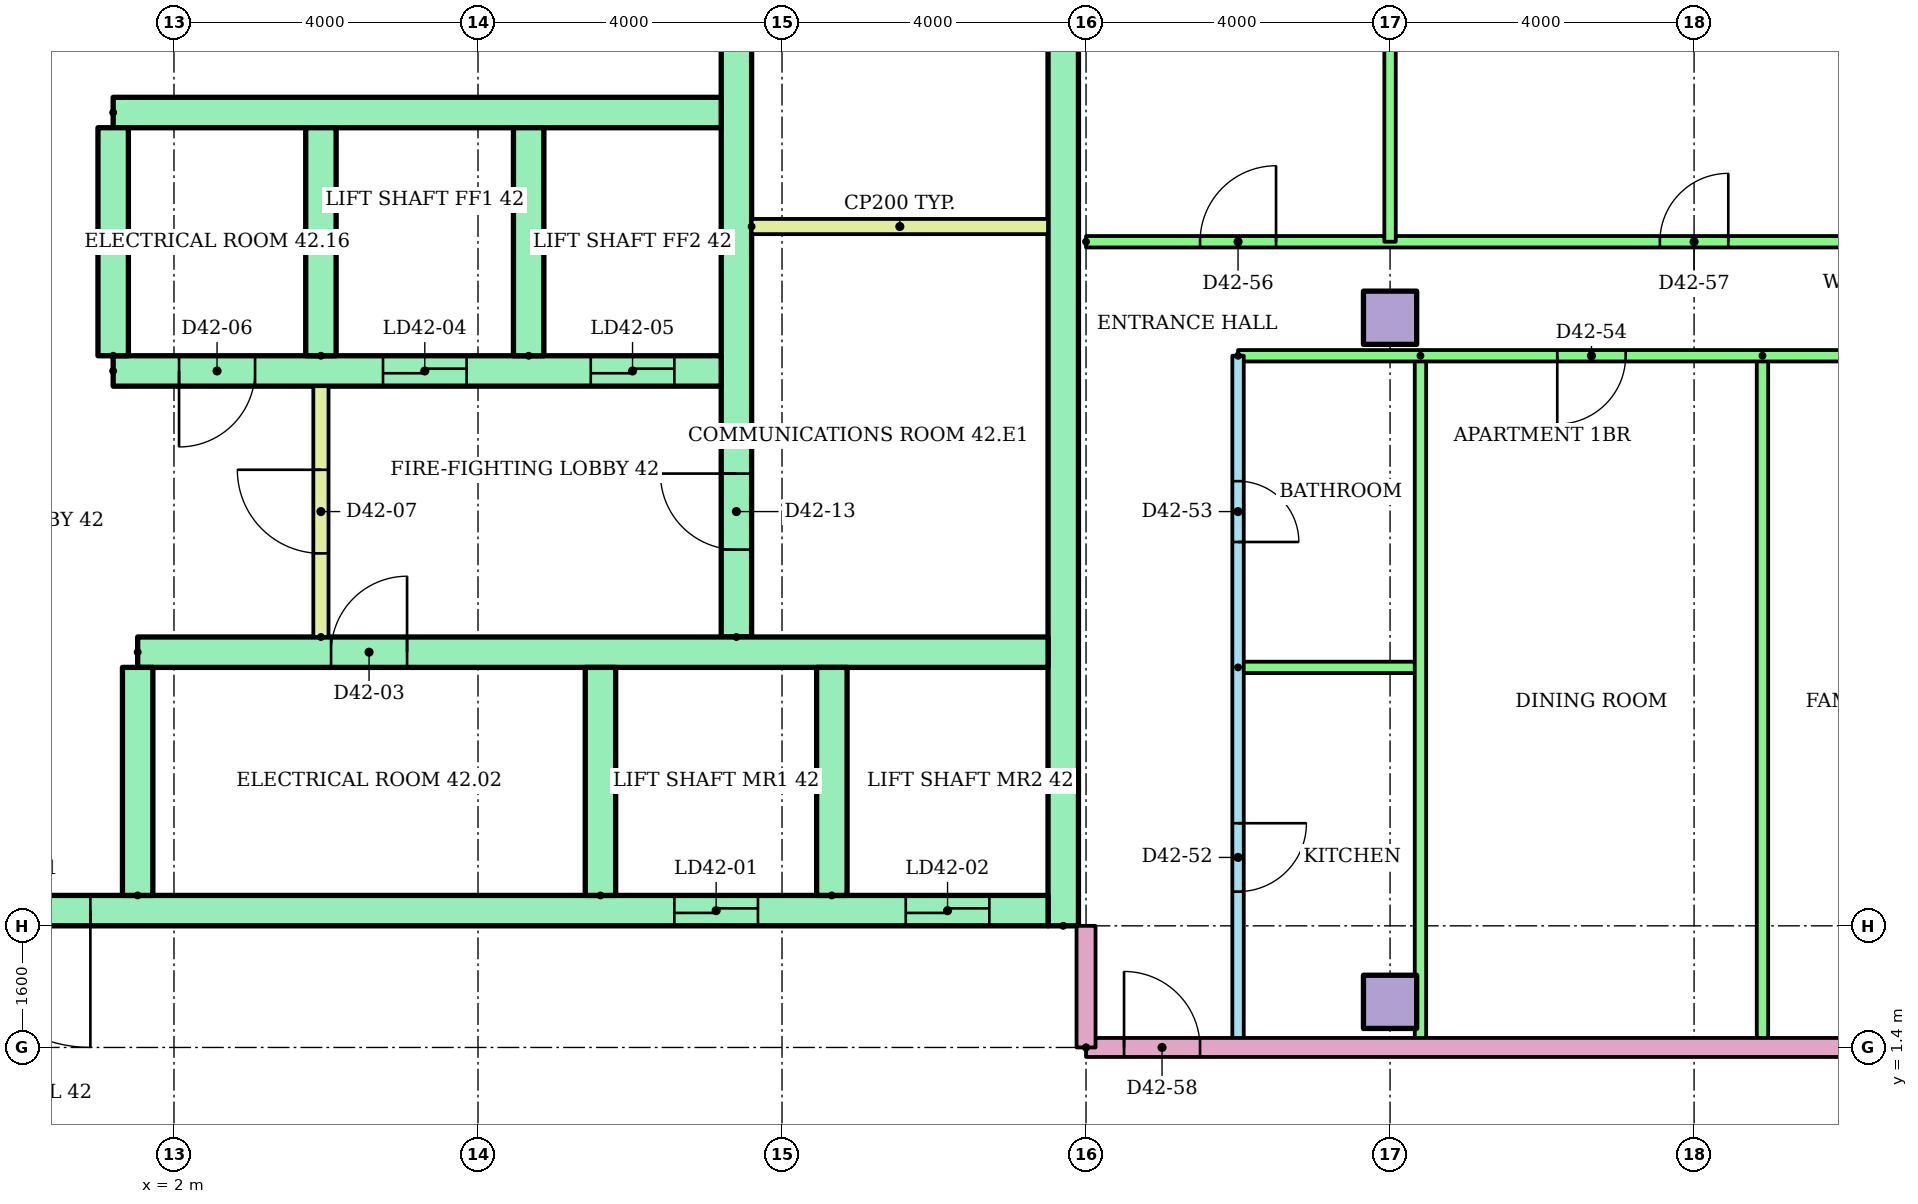
"""IFC4 building model, lengths in metres.
Left out: names, types, materials, properties, quantities, classifications, styles, units other than length and angle.
Written with IfcOpenShell. Run it as: python <this file> out.ifc"""

import sys

from ifc_helpers import new_model, si_unit, direction, frame, frame_2d, origin, origin_2d, place, context, subcontext, project, spatial, rectangle, extrude, element, fill, save


model = new_model("IFC4")
c1 = context("Model", 3, precision=1e-05, world=origin(), true_north=direction((0.0, 1.0)))
c2 = subcontext(c1, "Body", "Model", "MODEL_VIEW")
j1 = project(units=[si_unit("LENGTHUNIT", "METRE"), si_unit("PLANEANGLEUNIT", "RADIAN")], contexts=[c1])
p1 = place(None, origin())
s1 = spatial("IfcSite", under=j1, at=p1, CompositionType="ELEMENT")
p2 = place(p1, origin())
s2 = spatial("IfcBuilding", under=s1, at=p2, CompositionType="ELEMENT")
p3 = place(p2, frame((0.0, 0.0, 165.3)))
s3 = spatial("IfcBuildingStorey", under=s2, at=p3, CompositionType="ELEMENT", Elevation=165.3)
for number, where in (
    (1, (18.0, 2.0, 0.0)),
    (2, (18.0, 11.0, 0.0)),
):
    element("IfcColumn", number, at=place(p3, frame(where)), inside=s3, PredefinedType="COLUMN", context=c2, shape_type="SweptSolid", body=[
        extrude(rectangle(XDim=0.7, YDim=0.7, at=origin_2d()), origin(), (0.0, 0.0, 1.0), 3.2),
    ])
p4 = place(p3, frame((13.7, 3.0, 0.0), z_axis=(0.0, 0.0, 1.0), x_axis=(0.0, 1.0, 0.0)))
e3 = element("IfcWall", 3, at=p4, inside=s3, PredefinedType="SHEAR", context=c2, shape_type="SweptSolid", body=[
    extrude(rectangle(XDim=17.0, YDim=0.4, at=frame_2d((8.5, 0.0))), origin(), (0.0, 0.0, 1.0), 2.92),
])
p5 = place(p3, frame((9.4, 6.8, 0.0), z_axis=(0.0, 0.0, 1.0), x_axis=(0.0, 1.0, 0.0)))
e4 = element("IfcWall", 4, at=p5, inside=s3, PredefinedType="SHEAR", context=c2, shape_type="SweptSolid", body=[
    extrude(rectangle(XDim=12.7, YDim=0.4, at=frame_2d((6.35, 0.0))), origin(), (0.0, 0.0, 1.0), 2.92),
])
p6 = place(p5, frame((1.15, 0.0, 0.0)))
e5 = element("IfcOpeningElement", 5, at=p6, cuts=e4, PredefinedType="OPENING", context=c2, shape_type="SweptSolid", body=[
    extrude(rectangle(XDim=1.0, YDim=2.1, at=frame_2d((0.5, 1.05))), frame((0.0, 0.21, 0.0), z_axis=(0.0, -1.0, 0.0), x_axis=(1.0, 0.0, 0.0)), (0.0, 0.0, 1.0), 0.42),
])
p7 = place(p5, frame((7.925, 0.0, 0.0)))
e6 = element("IfcOpeningElement", 6, at=p7, cuts=e4, PredefinedType="OPENING", context=c2, shape_type="SweptSolid", body=[
    extrude(rectangle(XDim=1.0, YDim=2.1, at=frame_2d((0.5, 1.05))), frame((0.0, 0.21, 0.0), z_axis=(0.0, -1.0, 0.0), x_axis=(1.0, 0.0, 0.0)), (0.0, 0.0, 1.0), 0.42),
])
p8 = place(p3, frame((-13.5, 3.2, 0.0)))
e7 = element("IfcWall", 7, at=p8, inside=s3, PredefinedType="SHEAR", context=c2, shape_type="SweptSolid", body=[
    extrude(rectangle(XDim=27.0, YDim=0.4, at=frame_2d((13.5, 0.0))), origin(), (0.0, 0.0, 1.0), 2.92),
])
p9 = place(p8, frame((22.083, 0.0, 0.0)))
e8 = element("IfcOpeningElement", 8, at=p9, cuts=e7, PredefinedType="OPENING", context=c2, shape_type="SweptSolid", body=[
    extrude(rectangle(XDim=1.1, YDim=2.1, at=frame_2d((0.55, 1.05))), frame((0.0, 0.21, 0.0), z_axis=(0.0, -1.0, 0.0), x_axis=(1.0, 0.0, 0.0)), (0.0, 0.0, 1.0), 0.42),
])
p10 = place(p8, frame((25.128, 0.0, 0.0)))
e9 = element("IfcOpeningElement", 9, at=p10, cuts=e7, PredefinedType="OPENING", context=c2, shape_type="SweptSolid", body=[
    extrude(rectangle(XDim=1.1, YDim=2.1, at=frame_2d((0.55, 1.05))), frame((0.0, 0.21, 0.0), z_axis=(0.0, -1.0, 0.0), x_axis=(1.0, 0.0, 0.0)), (0.0, 0.0, 1.0), 0.42),
])
p11 = place(p8, frame((12.6, 0.0, 0.0)))
e10 = element("IfcOpeningElement", 10, at=p11, cuts=e7, PredefinedType="OPENING", context=c2, shape_type="SweptSolid", body=[
    extrude(rectangle(XDim=1.8, YDim=2.1, at=frame_2d((0.9, 1.05))), frame((0.0, 0.21, 0.0), z_axis=(0.0, -1.0, 0.0), x_axis=(1.0, 0.0, 0.0)), (0.0, 0.0, 1.0), 0.42),
])
p12 = place(p3, frame((1.522, 6.6, 0.0)))
e11 = element("IfcWall", 11, at=p12, inside=s3, PredefinedType="SHEAR", context=c2, shape_type="SweptSolid", body=[
    extrude(rectangle(XDim=11.978, YDim=0.4, at=frame_2d((5.989, 0.0))), origin(), (0.0, 0.0, 1.0), 2.92),
])
p13 = place(p12, frame((2.544, 0.0, 0.0)))
e12 = element("IfcOpeningElement", 12, at=p13, cuts=e11, PredefinedType="OPENING", context=c2, shape_type="SweptSolid", body=[
    extrude(rectangle(XDim=1.0, YDim=2.1, at=frame_2d((0.5, 1.05))), frame((0.0, 0.21, 0.0), z_axis=(0.0, -1.0, 0.0), x_axis=(1.0, 0.0, 0.0)), (0.0, 0.0, 1.0), 0.42),
])
for number, where, z_axis, x_axis in (
    (13, (1.522, 3.4, 0.0), (0.0, 0.0, 1.0), (0.0, 1.0, 0.0)),
    (14, (7.611, 3.4, 0.0), (0.0, 0.0, 1.0), (0.0, 1.0, 0.0)),
    (15, (10.656, 3.4, 0.0), (0.0, 0.0, 1.0), (0.0, 1.0, 0.0)),
):
    element("IfcWall", number, at=place(p3, frame(where, z_axis=z_axis, x_axis=x_axis)), inside=s3, PredefinedType="SHEAR", context=c2, shape_type="SweptSolid", body=[
        extrude(rectangle(XDim=3.0, YDim=0.4, at=frame_2d((1.5, 0.0))), origin(), (0.0, 0.0, 1.0), 2.92),
    ])
p14 = place(p3, frame((1.2, 10.3, 0.0)))
e16 = element("IfcWall", 16, at=p14, inside=s3, PredefinedType="SHEAR", context=c2, shape_type="SweptSolid", body=[
    extrude(rectangle(XDim=8.0, YDim=0.4, at=frame_2d((4.0, 0.0))), origin(), (0.0, 0.0, 1.0), 2.92),
])
p15 = place(p14, frame((3.55, 0.0, 0.0)))
e17 = element("IfcOpeningElement", 17, at=p15, cuts=e16, PredefinedType="OPENING", context=c2, shape_type="SweptSolid", body=[
    extrude(rectangle(XDim=1.1, YDim=2.1, at=frame_2d((0.55, 1.05))), frame((0.0, 0.21, 0.0), z_axis=(0.0, -1.0, 0.0), x_axis=(1.0, 0.0, 0.0)), (0.0, 0.0, 1.0), 0.42),
])
p16 = place(p14, frame((6.283, 0.0, 0.0)))
e18 = element("IfcOpeningElement", 18, at=p16, cuts=e16, PredefinedType="OPENING", context=c2, shape_type="SweptSolid", body=[
    extrude(rectangle(XDim=1.1, YDim=2.1, at=frame_2d((0.55, 1.05))), frame((0.0, 0.21, 0.0), z_axis=(0.0, -1.0, 0.0), x_axis=(1.0, 0.0, 0.0)), (0.0, 0.0, 1.0), 0.42),
])
p17 = place(p14, frame((0.867, 0.0, 0.0)))
e19 = element("IfcOpeningElement", 19, at=p17, cuts=e16, PredefinedType="OPENING", context=c2, shape_type="SweptSolid", body=[
    extrude(rectangle(XDim=1.0, YDim=2.1, at=frame_2d((0.5, 1.05))), frame((0.0, 0.21, 0.0), z_axis=(0.0, -1.0, 0.0), x_axis=(1.0, 0.0, 0.0)), (0.0, 0.0, 1.0), 0.42),
])
p18 = place(p3, frame((1.2, 13.7, 0.0)))
e20 = element("IfcWall", 20, at=p18, inside=s3, PredefinedType="SHEAR", context=c2, shape_type="SweptSolid", body=[
    extrude(rectangle(XDim=8.0, YDim=0.4, at=frame_2d((4.0, 0.0))), origin(), (0.0, 0.0, 1.0), 2.92),
])
for number, where, z_axis, x_axis in (
    (21, (1.2, 10.5, 0.0), (0.0, 0.0, 1.0), (0.0, 1.0, 0.0)),
    (22, (3.933, 10.5, 0.0), (0.0, 0.0, 1.0), (0.0, 1.0, 0.0)),
    (23, (6.667, 10.5, 0.0), (0.0, 0.0, 1.0), (0.0, 1.0, 0.0)),
):
    element("IfcWall", number, at=place(p3, frame(where, z_axis=z_axis, x_axis=x_axis)), inside=s3, PredefinedType="SHEAR", context=c2, shape_type="SweptSolid", body=[
        extrude(rectangle(XDim=3.0, YDim=0.4, at=frame_2d((1.5, 0.0))), origin(), (0.0, 0.0, 1.0), 2.92),
    ])
p19 = place(p3, frame((3.933, 6.8, 0.0), z_axis=(0.0, 0.0, 1.0), x_axis=(0.0, 1.0, 0.0)))
e24 = element("IfcWall", 24, at=p19, inside=s3, PredefinedType="PARTITIONING", context=c2, shape_type="SweptSolid", body=[
    extrude(rectangle(XDim=3.3, YDim=0.2, at=frame_2d((1.65, 0.0))), origin(), (0.0, 0.0, 1.0), 2.92),
])
p20 = place(p19, frame((1.1, 0.0, 0.0)))
e25 = element("IfcOpeningElement", 25, at=p20, cuts=e24, PredefinedType="OPENING", context=c2, shape_type="SweptSolid", body=[
    extrude(rectangle(XDim=1.1, YDim=2.1, at=frame_2d((0.55, 1.05))), frame((0.0, 0.11, 0.0), z_axis=(0.0, -1.0, 0.0), x_axis=(1.0, 0.0, 0.0)), (0.0, 0.0, 1.0), 0.22),
])
p21 = place(p3, frame((9.6, 12.2, 0.0)))
e26 = element("IfcWall", 26, at=p21, inside=s3, PredefinedType="PARTITIONING", context=c2, shape_type="SweptSolid", body=[
    extrude(rectangle(XDim=3.9, YDim=0.2, at=frame_2d((1.95, 0.0))), origin(), (0.0, 0.0, 1.0), 2.92),
])
p22 = place(p3, frame((16.0, 10.5, 0.0), z_axis=(0.0, 0.0, 1.0), x_axis=(0.0, -1.0, 0.0)))
e27 = element("IfcWall", 27, at=p22, inside=s3, PredefinedType="PARTITIONING", context=c2, shape_type="SweptSolid", body=[
    extrude(rectangle(XDim=9.1, YDim=0.15, at=frame_2d((4.55, 0.0))), origin(), (0.0, 0.0, 1.0), 2.4),
])
p23 = place(p22, frame((6.15, 0.0, 0.0)))
e28 = element("IfcOpeningElement", 28, at=p23, cuts=e27, PredefinedType="OPENING", context=c2, shape_type="SweptSolid", body=[
    extrude(rectangle(XDim=0.9, YDim=2.1, at=frame_2d((0.45, 1.05))), frame((0.0, 0.085, 0.0), z_axis=(0.0, -1.0, 0.0), x_axis=(1.0, 0.0, 0.0)), (0.0, 0.0, 1.0), 0.17),
])
p24 = place(p22, frame((1.65, 0.0, 0.0)))
e29 = element("IfcOpeningElement", 29, at=p24, cuts=e27, PredefinedType="OPENING", context=c2, shape_type="SweptSolid", body=[
    extrude(rectangle(XDim=0.8, YDim=2.1, at=frame_2d((0.4, 1.05))), frame((0.0, 0.085, 0.0), z_axis=(0.0, -1.0, 0.0), x_axis=(1.0, 0.0, 0.0)), (0.0, 0.0, 1.0), 0.17),
])
p25 = place(p3, frame((16.0, 6.4, 0.0)))
e30 = element("IfcWall", 30, at=p25, inside=s3, PredefinedType="PARTITIONING", context=c2, shape_type="SweptSolid", body=[
    extrude(rectangle(XDim=2.4, YDim=0.15, at=frame_2d((1.2, 0.0))), origin(), (0.0, 0.0, 1.0), 2.4),
])
for number, where, z_axis, x_axis in (
    (31, (18.4, 10.5, 0.0), (0.0, 0.0, 1.0), (0.0, -1.0, 0.0)),
    (32, (22.9, 10.5, 0.0), (0.0, 0.0, 1.0), (0.0, -1.0, 0.0)),
):
    element("IfcWall", number, at=place(p3, frame(where, z_axis=z_axis, x_axis=x_axis)), inside=s3, PredefinedType="PARTITIONING", context=c2, shape_type="SweptSolid", body=[
        extrude(rectangle(XDim=9.1, YDim=0.15, at=frame_2d((4.55, 0.0))), origin(), (0.0, 0.0, 1.0), 2.4),
    ])
p26 = place(p3, frame((26.0, 10.5, 0.0), z_axis=(0.0, 0.0, 1.0), x_axis=(-1.0, 0.0, 0.0)))
e33 = element("IfcWall", 33, at=p26, inside=s3, PredefinedType="PARTITIONING", context=c2, shape_type="SweptSolid", body=[
    extrude(rectangle(XDim=10.0, YDim=0.15, at=frame_2d((5.0, 0.0))), origin(), (0.0, 0.0, 1.0), 2.4),
])
p27 = place(p26, frame((4.9, 0.0, 0.0)))
e34 = element("IfcOpeningElement", 34, at=p27, cuts=e33, PredefinedType="OPENING", context=c2, shape_type="SweptSolid", body=[
    extrude(rectangle(XDim=0.9, YDim=2.1, at=frame_2d((0.45, 1.05))), frame((0.0, 0.085, 0.0), z_axis=(0.0, -1.0, 0.0), x_axis=(1.0, 0.0, 0.0)), (0.0, 0.0, 1.0), 0.17),
])
p28 = place(p26, frame((1.1, 0.0, 0.0)))
e35 = element("IfcOpeningElement", 35, at=p28, cuts=e33, PredefinedType="OPENING", context=c2, shape_type="SweptSolid", body=[
    extrude(rectangle(XDim=0.9, YDim=2.1, at=frame_2d((0.45, 1.05))), frame((0.0, 0.085, 0.0), z_axis=(0.0, -1.0, 0.0), x_axis=(1.0, 0.0, 0.0)), (0.0, 0.0, 1.0), 0.17),
])
p29 = place(p3, frame((14.0, 12.0, 0.0)))
e36 = element("IfcWall", 36, at=p29, inside=s3, PredefinedType="PARTITIONING", context=c2, shape_type="SweptSolid", body=[
    extrude(rectangle(XDim=12.0, YDim=0.15, at=frame_2d((6.0, 0.0))), origin(), (0.0, 0.0, 1.0), 2.4),
])
p30 = place(p29, frame((1.5, 0.0, 0.0)))
e37 = element("IfcOpeningElement", 37, at=p30, cuts=e36, PredefinedType="OPENING", context=c2, shape_type="SweptSolid", body=[
    extrude(rectangle(XDim=1.0, YDim=2.1, at=frame_2d((0.5, 1.05))), frame((0.0, 0.085, 0.0), z_axis=(0.0, -1.0, 0.0), x_axis=(1.0, 0.0, 0.0)), (0.0, 0.0, 1.0), 0.17),
])
p31 = place(p29, frame((7.55, 0.0, 0.0)))
e38 = element("IfcOpeningElement", 38, at=p31, cuts=e36, PredefinedType="OPENING", context=c2, shape_type="SweptSolid", body=[
    extrude(rectangle(XDim=0.9, YDim=2.1, at=frame_2d((0.45, 1.05))), frame((0.0, 0.085, 0.0), z_axis=(0.0, -1.0, 0.0), x_axis=(1.0, 0.0, 0.0)), (0.0, 0.0, 1.0), 0.17),
])
p32 = place(p3, frame((18.0, 18.821, 0.0), z_axis=(0.0, 0.0, 1.0), x_axis=(0.0, -1.0, 0.0)))
e39 = element("IfcWall", 39, at=p32, inside=s3, PredefinedType="PARTITIONING", context=c2, shape_type="SweptSolid", body=[
    extrude(rectangle(XDim=6.821, YDim=0.15, at=frame_2d((3.411, 0.0))), origin(), (0.0, 0.0, 1.0), 2.4),
])
p33 = place(p3, frame((14.0, 1.4, 0.0)))
e40 = element("IfcWall", 40, at=p33, inside=s3, PredefinedType="PARTITIONING", context=c2, shape_type="SweptSolid", body=[
    extrude(rectangle(XDim=15.0, YDim=0.25, at=frame_2d((7.5, 0.0))), origin(), (0.0, 0.0, 1.0), 2.4),
])
p34 = place(p33, frame((0.5, 0.0, 0.0)))
e41 = element("IfcOpeningElement", 41, at=p34, cuts=e40, PredefinedType="OPENING", context=c2, shape_type="SweptSolid", body=[
    extrude(rectangle(XDim=1.0, YDim=2.1, at=frame_2d((0.5, 1.05))), frame((0.0, 0.135, 0.0), z_axis=(0.0, -1.0, 0.0), x_axis=(1.0, 0.0, 0.0)), (0.0, 0.0, 1.0), 0.27),
])
p35 = place(p33, frame((12.547, 0.0, 0.0)))
e42 = element("IfcOpeningElement", 42, at=p35, cuts=e40, PredefinedType="OPENING", context=c2, shape_type="SweptSolid", body=[
    extrude(rectangle(XDim=1.0, YDim=2.1, at=frame_2d((0.5, 1.05))), frame((0.0, 0.135, 0.0), z_axis=(0.0, -1.0, 0.0), x_axis=(1.0, 0.0, 0.0)), (0.0, 0.0, 1.0), 0.27),
])
p36 = place(p3, frame((14.0, 1.4, 0.0), z_axis=(0.0, 0.0, 1.0), x_axis=(0.0, 1.0, 0.0)))
e43 = element("IfcWall", 43, at=p36, inside=s3, PredefinedType="PARTITIONING", context=c2, shape_type="SweptSolid", body=[
    extrude(rectangle(XDim=1.6, YDim=0.25, at=frame_2d((0.8, 0.0))), origin(), (0.0, 0.0, 1.0), 2.4),
])
p37 = place(p9, origin())
e44 = element("IfcDoor", 44, at=p37, inside=s3, OperationType="SLIDING_TO_LEFT", PredefinedType="DOOR", context=c2, shape_type="SweptSolid", body=[
    extrude(rectangle(XDim=1.1, YDim=2.1, at=frame_2d((0.55, 1.05))), frame((0.0, 0.025, 0.0), z_axis=(0.0, -1.0, 0.0), x_axis=(1.0, 0.0, 0.0)), (0.0, 0.0, 1.0), 0.05),
])
fill(e8, e44)
p38 = place(p10, origin())
e45 = element("IfcDoor", 45, at=p38, inside=s3, OperationType="SLIDING_TO_LEFT", PredefinedType="DOOR", context=c2, shape_type="SweptSolid", body=[
    extrude(rectangle(XDim=1.1, YDim=2.1, at=frame_2d((0.55, 1.05))), frame((0.0, 0.025, 0.0), z_axis=(0.0, -1.0, 0.0), x_axis=(1.0, 0.0, 0.0)), (0.0, 0.0, 1.0), 0.05),
])
fill(e9, e45)
p39 = place(p11, frame((1.8, 0.0, 0.0), z_axis=(0.0, 0.0, 1.0), x_axis=(-1.0, 0.0, 0.0)))
e46 = element("IfcDoor", 46, at=p39, inside=s3, OperationType="DOUBLE_DOOR_SINGLE_SWING", PredefinedType="DOOR", context=c2, shape_type="SweptSolid", body=[
    extrude(rectangle(XDim=1.8, YDim=2.1, at=frame_2d((0.9, 1.05))), frame((0.0, 0.025, 0.0), z_axis=(0.0, -1.0, 0.0), x_axis=(1.0, 0.0, 0.0)), (0.0, 0.0, 1.0), 0.05),
])
fill(e10, e46)
p40 = place(p13, origin())
e47 = element("IfcDoor", 47, at=p40, inside=s3, OperationType="SINGLE_SWING_RIGHT", PredefinedType="DOOR", context=c2, shape_type="SweptSolid", body=[
    extrude(rectangle(XDim=1.0, YDim=2.1, at=frame_2d((0.5, 1.05))), frame((0.0, 0.025, 0.0), z_axis=(0.0, -1.0, 0.0), x_axis=(1.0, 0.0, 0.0)), (0.0, 0.0, 1.0), 0.05),
])
fill(e12, e47)
p41 = place(p15, origin())
e48 = element("IfcDoor", 48, at=p41, inside=s3, OperationType="SLIDING_TO_LEFT", PredefinedType="DOOR", context=c2, shape_type="SweptSolid", body=[
    extrude(rectangle(XDim=1.1, YDim=2.1, at=frame_2d((0.55, 1.05))), frame((0.0, 0.025, 0.0), z_axis=(0.0, -1.0, 0.0), x_axis=(1.0, 0.0, 0.0)), (0.0, 0.0, 1.0), 0.05),
])
fill(e17, e48)
p42 = place(p16, origin())
e49 = element("IfcDoor", 49, at=p42, inside=s3, OperationType="SLIDING_TO_LEFT", PredefinedType="DOOR", context=c2, shape_type="SweptSolid", body=[
    extrude(rectangle(XDim=1.1, YDim=2.1, at=frame_2d((0.55, 1.05))), frame((0.0, 0.025, 0.0), z_axis=(0.0, -1.0, 0.0), x_axis=(1.0, 0.0, 0.0)), (0.0, 0.0, 1.0), 0.05),
])
fill(e18, e49)
p43 = place(p17, frame((1.0, 0.0, 0.0), z_axis=(0.0, 0.0, 1.0), x_axis=(-1.0, 0.0, 0.0)))
e50 = element("IfcDoor", 50, at=p43, inside=s3, OperationType="SINGLE_SWING_LEFT", PredefinedType="DOOR", context=c2, shape_type="SweptSolid", body=[
    extrude(rectangle(XDim=1.0, YDim=2.1, at=frame_2d((0.5, 1.05))), frame((0.0, 0.025, 0.0), z_axis=(0.0, -1.0, 0.0), x_axis=(1.0, 0.0, 0.0)), (0.0, 0.0, 1.0), 0.05),
])
fill(e19, e50)
p44 = place(p20, origin())
e51 = element("IfcDoor", 51, at=p44, inside=s3, OperationType="SINGLE_SWING_RIGHT", PredefinedType="DOOR", context=c2, shape_type="SweptSolid", body=[
    extrude(rectangle(XDim=1.1, YDim=2.1, at=frame_2d((0.55, 1.05))), frame((0.0, 0.025, 0.0), z_axis=(0.0, -1.0, 0.0), x_axis=(1.0, 0.0, 0.0)), (0.0, 0.0, 1.0), 0.05),
])
fill(e25, e51)
p45 = place(p6, origin())
e52 = element("IfcDoor", 52, at=p45, inside=s3, OperationType="SINGLE_SWING_RIGHT", PredefinedType="DOOR", context=c2, shape_type="SweptSolid", body=[
    extrude(rectangle(XDim=1.0, YDim=2.1, at=frame_2d((0.5, 1.05))), frame((0.0, 0.025, 0.0), z_axis=(0.0, -1.0, 0.0), x_axis=(1.0, 0.0, 0.0)), (0.0, 0.0, 1.0), 0.05),
])
fill(e5, e52)
p46 = place(p23, origin())
e53 = element("IfcDoor", 53, at=p46, inside=s3, OperationType="SINGLE_SWING_LEFT", PredefinedType="DOOR", context=c2, shape_type="SweptSolid", body=[
    extrude(rectangle(XDim=0.9, YDim=2.1, at=frame_2d((0.45, 1.05))), frame((0.0, 0.025, 0.0), z_axis=(0.0, -1.0, 0.0), x_axis=(1.0, 0.0, 0.0)), (0.0, 0.0, 1.0), 0.05),
])
fill(e28, e53)
p47 = place(p24, origin())
e54 = element("IfcDoor", 54, at=p47, inside=s3, OperationType="SINGLE_SWING_RIGHT", PredefinedType="DOOR", context=c2, shape_type="SweptSolid", body=[
    extrude(rectangle(XDim=0.8, YDim=2.1, at=frame_2d((0.4, 1.05))), frame((0.0, 0.025, 0.0), z_axis=(0.0, -1.0, 0.0), x_axis=(1.0, 0.0, 0.0)), (0.0, 0.0, 1.0), 0.05),
])
fill(e29, e54)
p48 = place(p27, origin())
e55 = element("IfcDoor", 55, at=p48, inside=s3, OperationType="SINGLE_SWING_RIGHT", PredefinedType="DOOR", context=c2, shape_type="SweptSolid", body=[
    extrude(rectangle(XDim=0.9, YDim=2.1, at=frame_2d((0.45, 1.05))), frame((0.0, 0.025, 0.0), z_axis=(0.0, -1.0, 0.0), x_axis=(1.0, 0.0, 0.0)), (0.0, 0.0, 1.0), 0.05),
])
fill(e34, e55)
p49 = place(p30, origin())
e56 = element("IfcDoor", 56, at=p49, inside=s3, OperationType="SINGLE_SWING_RIGHT", PredefinedType="DOOR", context=c2, shape_type="SweptSolid", body=[
    extrude(rectangle(XDim=1.0, YDim=2.1, at=frame_2d((0.5, 1.05))), frame((0.0, 0.025, 0.0), z_axis=(0.0, -1.0, 0.0), x_axis=(1.0, 0.0, 0.0)), (0.0, 0.0, 1.0), 0.05),
])
fill(e37, e56)
p50 = place(p31, origin())
e57 = element("IfcDoor", 57, at=p50, inside=s3, OperationType="SINGLE_SWING_RIGHT", PredefinedType="DOOR", context=c2, shape_type="SweptSolid", body=[
    extrude(rectangle(XDim=0.9, YDim=2.1, at=frame_2d((0.45, 1.05))), frame((0.0, 0.025, 0.0), z_axis=(0.0, -1.0, 0.0), x_axis=(1.0, 0.0, 0.0)), (0.0, 0.0, 1.0), 0.05),
])
fill(e38, e57)
p51 = place(p34, origin())
e58 = element("IfcDoor", 58, at=p51, inside=s3, OperationType="SINGLE_SWING_LEFT", PredefinedType="DOOR", context=c2, shape_type="SweptSolid", body=[
    extrude(rectangle(XDim=1.0, YDim=2.1, at=frame_2d((0.5, 1.05))), frame((0.0, 0.025, 0.0), z_axis=(0.0, -1.0, 0.0), x_axis=(1.0, 0.0, 0.0)), (0.0, 0.0, 1.0), 0.05),
])
fill(e41, e58)
save(model, sys.argv[1])
